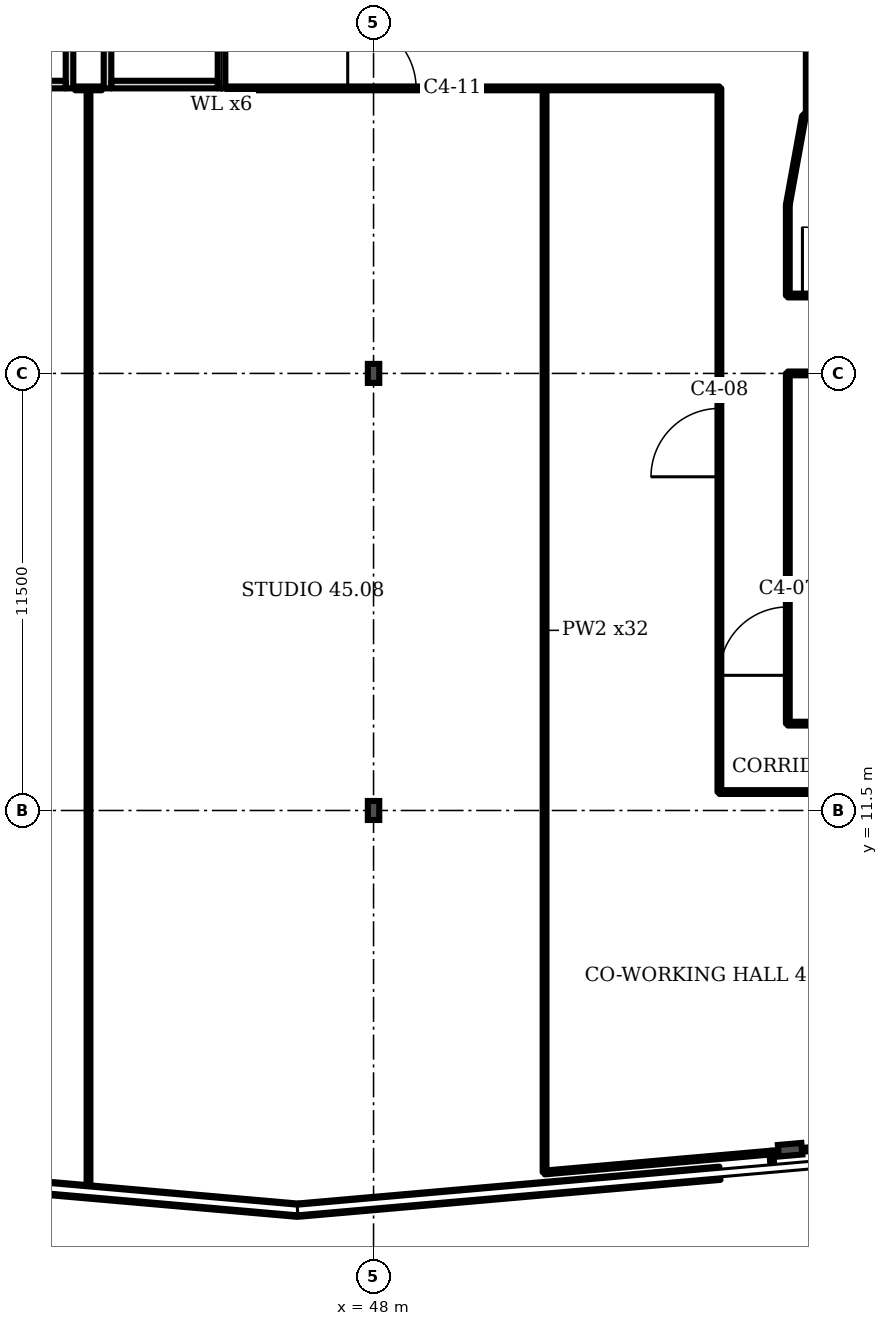
"""IFC4 building model, lengths in metres.
Left out: names, types, materials, properties, quantities, classifications, styles, units other than length and angle.
Written with IfcOpenShell. Run it as: python <this file> out.ifc"""

import sys

from ifc_helpers import new_model, si_unit, direction, frame, frame_2d, origin, origin_2d, place, context, subcontext, project, spatial, rectangle, i_section, extrude, element, fill, save


model = new_model("IFC4")
c1 = context("Model", 3, precision=1e-05, world=origin(), true_north=direction((0.0, 1.0)))
c2 = subcontext(c1, "Body", "Model", "MODEL_VIEW")
j1 = project(units=[si_unit("LENGTHUNIT", "METRE"), si_unit("PLANEANGLEUNIT", "RADIAN")], contexts=[c1])
p1 = place(None, origin())
s1 = spatial("IfcSite", under=j1, at=p1, CompositionType="ELEMENT")
p2 = place(p1, origin())
s2 = spatial("IfcBuilding", under=s1, at=p2, CompositionType="ELEMENT")
p3 = place(p2, frame((0.0, 0.0, 184.3)))
s3 = spatial("IfcBuildingStorey", under=s2, at=p3, CompositionType="ELEMENT", Elevation=184.3)
p4 = place(p3, frame((58.961, 2.573, 0.0), z_axis=(0.0, 0.0, 1.0), x_axis=(0.087156, -0.996198, 0.0)))
e1 = element("IfcColumn", 1, at=p4, inside=s3, PredefinedType="COLUMN", context=c2, shape_type="SweptSolid", body=[
    extrude(i_section(OverallWidth=0.305, OverallDepth=0.62, WebThickness=0.021, FlangeThickness=0.04, FilletRadius=0.027, at=origin_2d()), origin(), (0.0, 0.0, 1.0), 3.6),
])
for number, where, z_axis, x_axis in (
    (2, (48.0, 11.5, 0.0), (0.0, 0.0, 1.0), (1.0, 0.0, 0.0)),
    (3, (48.0, 23.0, 0.0), (0.0, 0.0, 1.0), (1.0, 0.0, 0.0)),
):
    element("IfcColumn", number, at=place(p3, frame(where, z_axis=z_axis, x_axis=x_axis)), inside=s3, PredefinedType="COLUMN", context=c2, shape_type="SweptSolid", body=[
        extrude(i_section(OverallWidth=0.3, OverallDepth=0.5, WebThickness=0.014, FlangeThickness=0.028, FilletRadius=0.027, at=origin_2d()), origin(), (0.0, 0.0, 1.0), 3.6),
    ])
p5 = place(p3, frame((35.03, 1.943, 0.0), z_axis=(0.0, 0.0, 1.0), x_axis=(0.996199, -0.08714, 0.0)))
e4 = element("IfcWall", 4, at=p5, inside=s3, PredefinedType="SOLIDWALL", context=c2, shape_type="SweptSolid", body=[
    extrude(rectangle(XDim=11.028, YDim=0.35, at=frame_2d((5.514, 0.0))), origin(), (0.0, 0.0, 1.0), 1.0),
])
p6 = place(p3, frame((46.045, 0.987, 0.0), z_axis=(0.0, 0.0, 1.0), x_axis=(0.996193, 0.087171, 0.0)))
e5 = element("IfcWall", 5, at=p6, inside=s3, PredefinedType="SOLIDWALL", context=c2, shape_type="SweptSolid", body=[
    extrude(rectangle(XDim=11.11, YDim=0.35, at=frame_2d((5.555, 0.0))), origin(), (0.0, 0.0, 1.0), 1.0),
])
p7 = place(p3, frame((40.0, 30.5, 0.0), z_axis=(0.0, 0.0, 1.0), x_axis=(0.0, 1.0, 0.0)))
e6 = element("IfcWall", 6, at=p7, inside=s3, PredefinedType="PARTITIONING", context=c2, shape_type="SweptSolid", body=[
    extrude(rectangle(XDim=3.5, YDim=0.2, at=frame_2d((1.75, 0.0))), origin(), (0.0, 0.0, 1.0), 3.2),
])
p8 = place(p3, frame((37.1, 30.6, 0.0), z_axis=(0.0, 0.0, 1.0), x_axis=(1.0, 0.0, 0.0)))
e7 = element("IfcWall", 7, at=p8, inside=s3, PredefinedType="PARTITIONING", context=c2, shape_type="SweptSolid", body=[
    extrude(rectangle(XDim=2.8, YDim=0.2, at=frame_2d((1.4, 0.0))), origin(), (0.0, 0.0, 1.0), 3.2),
])
p9 = place(p3, frame((41.0, 30.5, 0.0), z_axis=(0.0, 0.0, 1.0), x_axis=(0.0, 1.0, 0.0)))
e8 = element("IfcWall", 8, at=p9, inside=s3, PredefinedType="PARTITIONING", context=c2, shape_type="SweptSolid", body=[
    extrude(rectangle(XDim=3.5, YDim=0.2, at=frame_2d((1.75, 0.0))), origin(), (0.0, 0.0, 1.0), 3.2),
])
p10 = place(p3, frame((44.0, 30.5, 0.0), z_axis=(0.0, 0.0, 1.0), x_axis=(0.0, 1.0, 0.0)))
e9 = element("IfcWall", 9, at=p10, inside=s3, PredefinedType="PARTITIONING", context=c2, shape_type="SweptSolid", body=[
    extrude(rectangle(XDim=3.5, YDim=0.2, at=frame_2d((1.75, 0.0))), origin(), (0.0, 0.0, 1.0), 3.2),
])
p11 = place(p10, frame((1.2, 0.0, 0.0)))
e10 = element("IfcOpeningElement", 10, at=p11, cuts=e9, PredefinedType="OPENING", context=c2, shape_type="SweptSolid", body=[
    extrude(rectangle(XDim=1.1, YDim=2.1, at=frame_2d((0.55, 1.05))), frame((0.0, 0.11, 0.0), z_axis=(0.0, -1.0, 0.0), x_axis=(1.0, 0.0, 0.0)), (0.0, 0.0, 1.0), 0.22),
])
p12 = place(p3, frame((41.1, 30.6, 0.0), z_axis=(0.0, 0.0, 1.0), x_axis=(1.0, 0.0, 0.0)))
e11 = element("IfcWall", 11, at=p12, inside=s3, PredefinedType="PARTITIONING", context=c2, shape_type="SweptSolid", body=[
    extrude(rectangle(XDim=2.8, YDim=0.2, at=frame_2d((1.4, 0.0))), origin(), (0.0, 0.0, 1.0), 3.2),
])
p13 = place(p3, frame((40.5, 1.489, 0.0), z_axis=(0.0, 0.0, 1.0), x_axis=(0.0, 1.0, 0.0)))
e12 = element("IfcWall", 12, at=p13, inside=s3, PredefinedType="PARTITIONING", context=c2, shape_type="SweptSolid", body=[
    extrude(rectangle(XDim=29.011, YDim=0.1, at=frame_2d((14.505, 0.0))), origin(), (0.0, 0.0, 1.0), 3.2),
])
p14 = place(p3, frame((52.5, 1.98, 0.0), z_axis=(0.0, 0.0, 1.0), x_axis=(0.0, 1.0, 0.0)))
e13 = element("IfcWall", 13, at=p14, inside=s3, PredefinedType="PARTITIONING", context=c2, shape_type="SweptSolid", body=[
    extrude(rectangle(XDim=28.52, YDim=0.1, at=frame_2d((14.26, 0.0))), origin(), (0.0, 0.0, 1.0), 3.2),
])
p15 = place(p3, frame((52.5, 1.975, 0.0), z_axis=(0.0, 0.0, 1.0), x_axis=(0.99615, 0.087657, 0.0)))
e14 = element("IfcWall", 14, at=p15, inside=s3, PredefinedType="PARTITIONING", context=c2, shape_type="SweptSolid", body=[
    extrude(rectangle(XDim=5.988, YDim=0.1, at=frame_2d((2.994, 0.0))), origin(), (0.0, 0.0, 1.0), 3.2),
])
p16 = place(p3, frame((57.1, 11.985, 0.0), z_axis=(0.0, 0.0, 1.0), x_axis=(0.0, 1.0, 0.0)))
e15 = element("IfcWall", 15, at=p16, inside=s3, PredefinedType="PARTITIONING", context=c2, shape_type="SweptSolid", body=[
    extrude(rectangle(XDim=18.515, YDim=0.1, at=frame_2d((9.257, 0.0))), origin(), (0.0, 0.0, 1.0), 3.2),
])
p17 = place(p16, frame((8.295, 0.0, 0.0)))
e16 = element("IfcOpeningElement", 16, at=p17, cuts=e15, PredefinedType="OPENING", context=c2, shape_type="SweptSolid", body=[
    extrude(rectangle(XDim=1.8, YDim=2.1, at=frame_2d((0.9, 1.05))), frame((0.0, 0.06, 0.0), z_axis=(0.0, -1.0, 0.0), x_axis=(1.0, 0.0, 0.0)), (0.0, 0.0, 1.0), 0.12),
])
p18 = place(p3, frame((57.1, 11.985, 0.0), z_axis=(0.0, 0.0, 1.0), x_axis=(1.0, 0.0, 0.0)))
e17 = element("IfcWall", 17, at=p18, inside=s3, PredefinedType="PARTITIONING", context=c2, shape_type="SweptSolid", body=[
    extrude(rectangle(XDim=4.691, YDim=0.1, at=frame_2d((2.346, 0.0))), origin(), (0.0, 0.0, 1.0), 3.2),
])
p19 = place(p3, frame((58.465, 2.5, 0.0), z_axis=(0.0, 0.0, 1.0), x_axis=(0.996263, 0.086355, 0.0)))
e18 = element("IfcWall", 18, at=p19, inside=s3, PredefinedType="PARTITIONING", context=c2, shape_type="SweptSolid", body=[
    extrude(rectangle(XDim=3.339, YDim=0.1, at=frame_2d((1.669, 0.0))), origin(), (0.0, 0.0, 1.0), 2.58),
])
p20 = place(p3, frame((58.498, 2.102, 0.0), z_axis=(0.0, 0.0, 1.0), x_axis=(-0.083045, 0.996542, 0.0)))
e19 = element("IfcWall", 19, at=p20, inside=s3, PredefinedType="PARTITIONING", context=c2, shape_type="SweptSolid", body=[
    extrude(rectangle(XDim=0.4, YDim=0.1, at=frame_2d((0.2, 0.0))), origin(), (0.0, 0.0, 1.0), 3.2),
])
p21 = place(p3, frame((58.9, 13.785, 0.0), z_axis=(0.0, 0.0, 1.0), x_axis=(0.0, 1.0, 0.0)))
e20 = element("IfcWall", 20, at=p21, inside=s3, PredefinedType="PARTITIONING", context=c2, shape_type="SweptSolid", body=[
    extrude(rectangle(XDim=9.215, YDim=0.1, at=frame_2d((4.607, 0.0))), origin(), (0.0, 0.0, 1.0), 3.2),
])
p22 = place(p21, frame((1.271, 0.0, 0.0)))
e21 = element("IfcOpeningElement", 21, at=p22, cuts=e20, PredefinedType="OPENING", context=c2, shape_type="SweptSolid", body=[
    extrude(rectangle(XDim=1.8, YDim=2.1, at=frame_2d((0.9, 1.05))), frame((0.0, 0.06, 0.0), z_axis=(0.0, -1.0, 0.0), x_axis=(1.0, 0.0, 0.0)), (0.0, 0.0, 1.0), 0.12),
])
p23 = place(p3, frame((58.9, 13.785, 0.0), z_axis=(0.0, 0.0, 1.0), x_axis=(1.0, 0.0, 0.0)))
e22 = element("IfcWall", 22, at=p23, inside=s3, PredefinedType="PARTITIONING", context=c2, shape_type="SweptSolid", body=[
    extrude(rectangle(XDim=7.96, YDim=0.1, at=frame_2d((3.98, 0.0))), origin(), (0.0, 0.0, 1.0), 3.2),
])
p24 = place(p3, frame((58.9, 23.0, 0.0), z_axis=(0.0, 0.0, 1.0), x_axis=(1.0, 0.0, 0.0)))
e23 = element("IfcWall", 23, at=p24, inside=s3, PredefinedType="PARTITIONING", context=c2, shape_type="SweptSolid", body=[
    extrude(rectangle(XDim=3.585, YDim=0.1, at=frame_2d((1.792, 0.0))), origin(), (0.0, 0.0, 1.0), 3.2),
])
p25 = place(p3, frame((58.9, 25.05, 0.0), z_axis=(0.0, 0.0, 1.0), x_axis=(0.0, 1.0, 0.0)))
e24 = element("IfcWall", 24, at=p25, inside=s3, PredefinedType="PARTITIONING", context=c2, shape_type="SweptSolid", body=[
    extrude(rectangle(XDim=2.385, YDim=0.1, at=frame_2d((1.192, 0.0))), origin(), (0.0, 0.0, 1.0), 3.2),
])
p26 = place(p3, frame((58.9, 25.05, 0.0), z_axis=(0.0, 0.0, 1.0), x_axis=(1.0, 0.0, 0.0)))
e25 = element("IfcWall", 25, at=p26, inside=s3, PredefinedType="PARTITIONING", context=c2, shape_type="SweptSolid", body=[
    extrude(rectangle(XDim=4.985, YDim=0.1, at=frame_2d((2.492, 0.0))), origin(), (0.0, 0.0, 1.0), 3.2),
])
p27 = place(p26, frame((0.385, 0.0, 0.0)))
e26 = element("IfcOpeningElement", 26, at=p27, cuts=e25, PredefinedType="OPENING", context=c2, shape_type="SweptSolid", body=[
    extrude(rectangle(XDim=1.8, YDim=2.1, at=frame_2d((0.9, 1.05))), frame((0.0, 0.06, 0.0), z_axis=(0.0, -1.0, 0.0), x_axis=(1.0, 0.0, 0.0)), (0.0, 0.0, 1.0), 0.12),
])
p28 = place(p3, frame((58.9, 27.435, 0.0), z_axis=(0.0, 0.0, 1.0), x_axis=(0.178584, 0.983924, 0.0)))
e27 = element("IfcWall", 27, at=p28, inside=s3, PredefinedType="PARTITIONING", context=c2, shape_type="SweptSolid", body=[
    extrude(rectangle(XDim=2.353, YDim=0.1, at=frame_2d((1.176, 0.0))), origin(), (0.0, 0.0, 1.0), 3.2),
])
p29 = place(p3, frame((59.32, 29.75, 0.0), z_axis=(0.0, 0.0, 1.0), x_axis=(0.741581, 0.670872, 0.0)))
e28 = element("IfcWall", 28, at=p29, inside=s3, PredefinedType="PARTITIONING", context=c2, shape_type="SweptSolid", body=[
    extrude(rectangle(XDim=0.142, YDim=0.1, at=frame_2d((0.071, 0.0))), origin(), (0.0, 0.0, 1.0), 3.2),
])
p30 = place(p3, frame((59.425, 29.845, 0.0), z_axis=(0.0, 0.0, 1.0), x_axis=(0.0, 1.0, 0.0)))
e29 = element("IfcWall", 29, at=p30, inside=s3, PredefinedType="PARTITIONING", context=c2, shape_type="SweptSolid", body=[
    extrude(rectangle(XDim=2.08, YDim=0.1, at=frame_2d((1.04, 0.0))), origin(), (0.0, 0.0, 1.0), 3.2),
])
p31 = place(p3, frame((40.15, 30.5, 0.0), z_axis=(0.0, 0.0, 1.0), x_axis=(1.0, 0.0, 0.0)))
e30 = element("IfcWall", 30, at=p31, inside=s3, PredefinedType="PARTITIONING", context=c2, shape_type="SweptSolid", body=[
    extrude(rectangle(XDim=0.7, YDim=0.1, at=frame_2d((0.35, 0.0))), origin(), (0.0, 0.0, 1.0), 3.2),
])
p32 = place(p3, frame((44.15, 30.5, 0.0), z_axis=(0.0, 0.0, 1.0), x_axis=(1.0, 0.0, 0.0)))
e31 = element("IfcWall", 31, at=p32, inside=s3, PredefinedType="PARTITIONING", context=c2, shape_type="SweptSolid", body=[
    extrude(rectangle(XDim=12.95, YDim=0.1, at=frame_2d((6.475, 0.0))), origin(), (0.0, 0.0, 1.0), 3.2),
])
p33 = place(p32, frame((3.17, 0.0, 0.0)))
e32 = element("IfcOpeningElement", 32, at=p33, cuts=e31, PredefinedType="OPENING", context=c2, shape_type="SweptSolid", body=[
    extrude(rectangle(XDim=1.8, YDim=2.1, at=frame_2d((0.9, 1.05))), frame((0.0, 0.06, 0.0), z_axis=(0.0, -1.0, 0.0), x_axis=(1.0, 0.0, 0.0)), (0.0, 0.0, 1.0), 0.12),
])
p34 = place(p22, origin())
e33 = element("IfcDoor", 33, at=p34, inside=s3, OperationType="DOUBLE_DOOR_SINGLE_SWING", PredefinedType="DOOR", context=c2, shape_type="SweptSolid", body=[
    extrude(rectangle(XDim=1.8, YDim=2.1, at=frame_2d((0.9, 1.05))), frame((0.0, 0.025, 0.0), z_axis=(0.0, -1.0, 0.0), x_axis=(1.0, 0.0, 0.0)), (0.0, 0.0, 1.0), 0.05),
])
fill(e21, e33)
p35 = place(p17, origin())
e34 = element("IfcDoor", 34, at=p35, inside=s3, OperationType="DOUBLE_DOOR_SINGLE_SWING", PredefinedType="DOOR", context=c2, shape_type="SweptSolid", body=[
    extrude(rectangle(XDim=1.8, YDim=2.1, at=frame_2d((0.9, 1.05))), frame((0.0, 0.025, 0.0), z_axis=(0.0, -1.0, 0.0), x_axis=(1.0, 0.0, 0.0)), (0.0, 0.0, 1.0), 0.05),
])
fill(e16, e34)
p36 = place(p27, origin())
e35 = element("IfcDoor", 35, at=p36, inside=s3, OperationType="DOUBLE_DOOR_SINGLE_SWING", PredefinedType="DOOR", context=c2, shape_type="SweptSolid", body=[
    extrude(rectangle(XDim=1.8, YDim=2.1, at=frame_2d((0.9, 1.05))), frame((0.0, 0.025, 0.0), z_axis=(0.0, -1.0, 0.0), x_axis=(1.0, 0.0, 0.0)), (0.0, 0.0, 1.0), 0.05),
])
fill(e26, e35)
p37 = place(p33, origin())
e36 = element("IfcDoor", 36, at=p37, inside=s3, OperationType="DOUBLE_DOOR_SINGLE_SWING", PredefinedType="DOOR", context=c2, shape_type="SweptSolid", body=[
    extrude(rectangle(XDim=1.8, YDim=2.1, at=frame_2d((0.9, 1.05))), frame((0.0, 0.025, 0.0), z_axis=(0.0, -1.0, 0.0), x_axis=(1.0, 0.0, 0.0)), (0.0, 0.0, 1.0), 0.05),
])
fill(e32, e36)
save(model, sys.argv[1])
